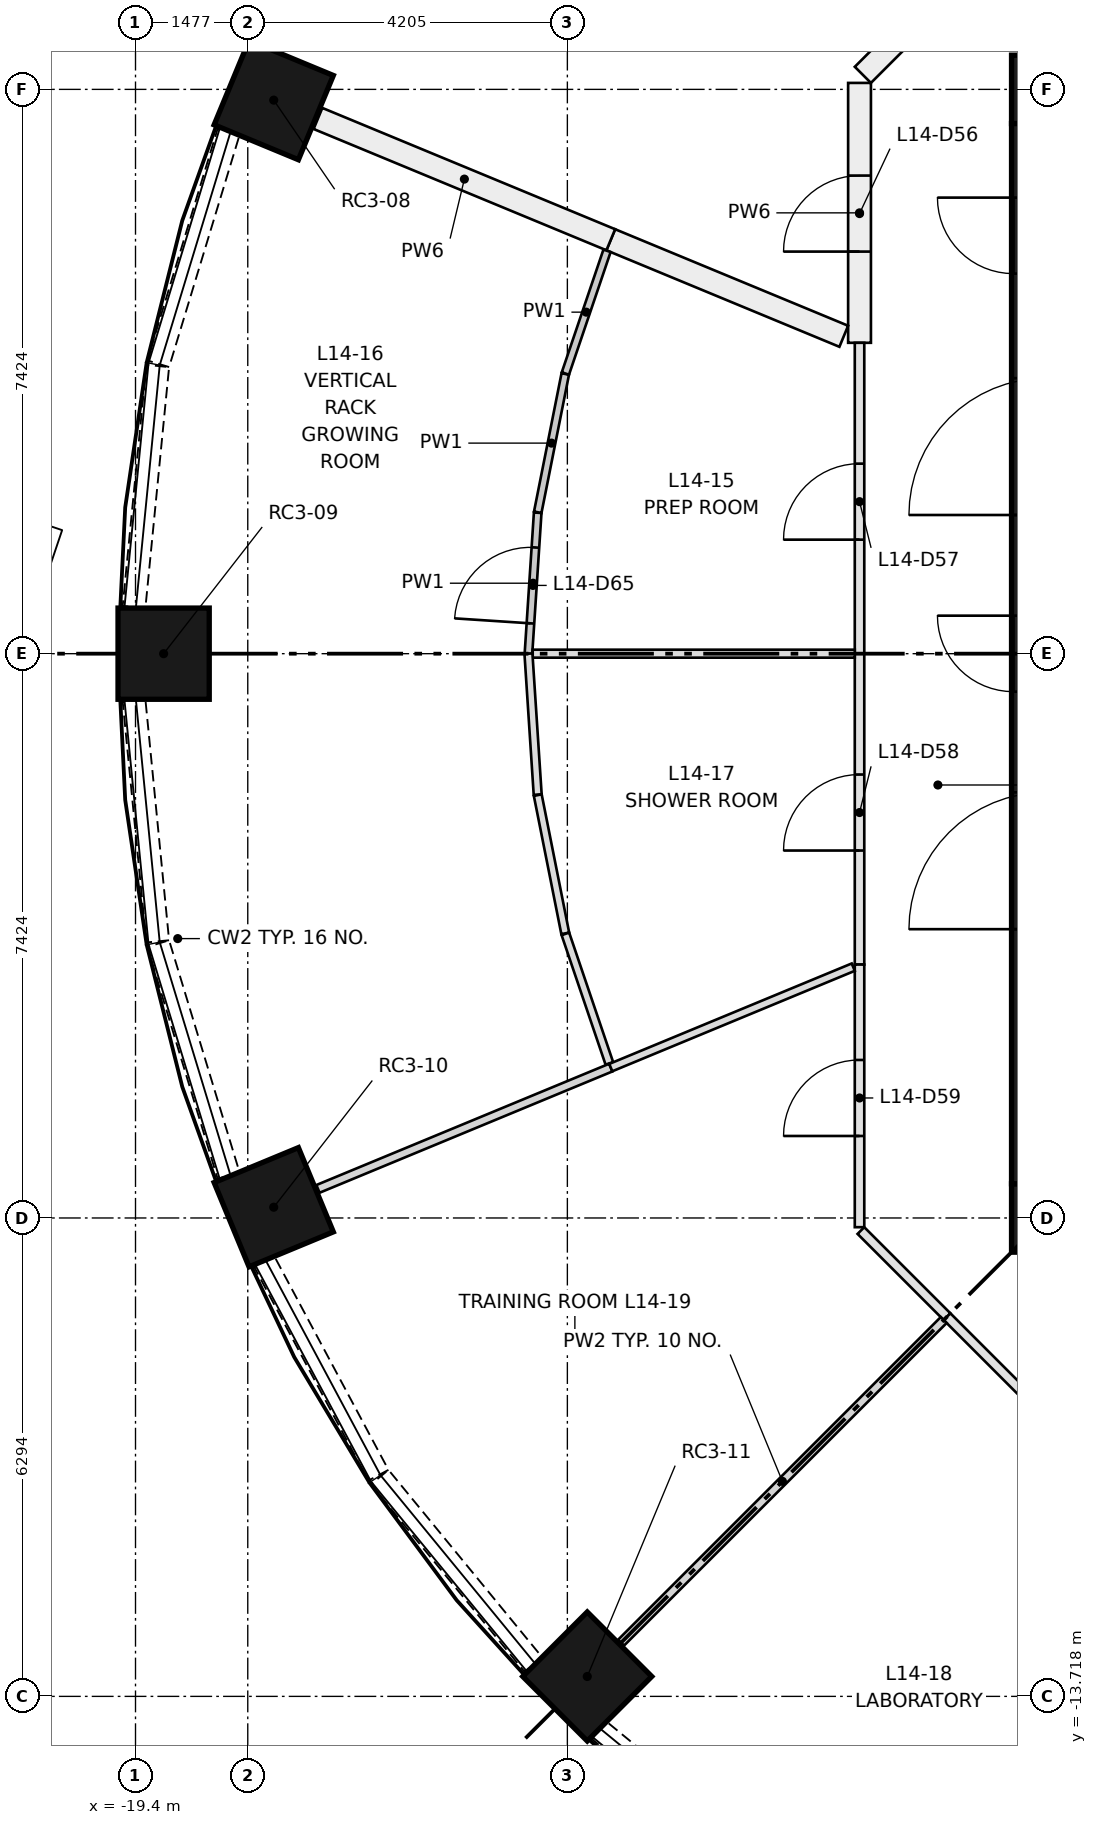
"""IFC4 building model, lengths in metres.
Left out: names, types, materials, properties, quantities, classifications, styles, units other than length and angle.
Written with IfcOpenShell. Run it as: python <this file> out.ifc"""

import sys

from ifc_helpers import new_model, si_unit, direction, frame, frame_2d, origin, origin_2d, place, context, subcontext, project, spatial, rectangle, extrude, element, fill, save


model = new_model("IFC4")
c1 = context("Model", 3, precision=1e-05, world=origin(), true_north=direction((0.0, 1.0)))
c2 = subcontext(c1, "Body", "Model", "MODEL_VIEW")
j1 = project(units=[si_unit("LENGTHUNIT", "METRE"), si_unit("PLANEANGLEUNIT", "RADIAN")], contexts=[c1])
p1 = place(None, origin())
s1 = spatial("IfcSite", under=j1, at=p1, CompositionType="ELEMENT")
p2 = place(p1, origin())
s2 = spatial("IfcBuilding", under=s1, at=p2, CompositionType="ELEMENT")
p3 = place(p2, frame((0.0, 0.0, 55.4)))
s3 = spatial("IfcBuildingStorey", under=s2, at=p3, CompositionType="ELEMENT", Elevation=55.4)
for number, where, z_axis, x_axis in (
    (1, (-17.582, 7.282, 0.0), (0.0, 0.0, 1.0), (-0.924, 0.383, 0.0)),
    (2, (-19.03, 0.0, 0.0), (0.0, 0.0, 1.0), (-1.0, 0.0, 0.0)),
    (3, (-17.582, -7.282, 0.0), (0.0, 0.0, 1.0), (-0.924, -0.383, 0.0)),
    (4, (-13.456, -13.456, 0.0), (0.0, 0.0, 1.0), (-0.707, -0.707, 0.0)),
):
    element("IfcColumn", number, at=place(p3, frame(where, z_axis=z_axis, x_axis=x_axis)), inside=s3, PredefinedType="COLUMN", context=c2, shape_type="SweptSolid", body=[
        extrude(rectangle(XDim=1.2, YDim=1.2, at=origin_2d()), origin(), (0.0, 0.0, 1.0), 3.65),
    ])
for number, where, z_axis, x_axis in (
    (5, (-7.874, -7.424, 0.0), (0.0, 0.0, 1.0), (1.0, 0.0, 0.0)),
    (6, (-7.874, 7.424, 0.0), (0.0, 0.0, 1.0), (1.0, 0.0, 0.0)),
):
    element("IfcWall", number, at=place(p3, frame(where, z_axis=z_axis, x_axis=x_axis)), inside=s3, PredefinedType="SHEAR", context=c2, shape_type="SweptSolid", body=[
        extrude(rectangle(XDim=15.748, YDim=0.9, at=frame_2d((7.874, 0.0))), origin(), (0.0, 0.0, 1.0), 3.65),
    ])
p4 = place(p3, frame((-7.424, -6.974, 0.0), z_axis=(0.0, 0.0, 1.0), x_axis=(0.0, 1.0, 0.0)))
e7 = element("IfcWall", 7, at=p4, inside=s3, PredefinedType="SHEAR", context=c2, shape_type="SweptSolid", body=[
    extrude(rectangle(XDim=13.948, YDim=0.9, at=frame_2d((6.974, 0.0))), origin(), (0.0, 0.0, 1.0), 3.65),
])
p5 = place(p4, frame((6.474, 0.0, 0.0)))
e8 = element("IfcOpeningElement", 8, at=p5, cuts=e7, PredefinedType="OPENING", context=c2, shape_type="SweptSolid", body=[
    extrude(rectangle(XDim=1.0, YDim=2.1, at=frame_2d((0.5, 1.05))), frame((0.0, 0.46, 0.0), z_axis=(0.0, -1.0, 0.0), x_axis=(1.0, 0.0, 0.0)), (0.0, 0.0, 1.0), 0.92),
])
p6 = place(p4, frame((3.35, 0.0, 0.0)))
e9 = element("IfcOpeningElement", 9, at=p6, cuts=e7, PredefinedType="OPENING", context=c2, shape_type="SweptSolid", body=[
    extrude(rectangle(XDim=1.8, YDim=2.1, at=frame_2d((0.9, 1.05))), frame((0.0, 0.46, 0.0), z_axis=(0.0, -1.0, 0.0), x_axis=(1.0, 0.0, 0.0)), (0.0, 0.0, 1.0), 0.92),
])
p7 = place(p4, frame((8.799, 0.0, 0.0)))
e10 = element("IfcOpeningElement", 10, at=p7, cuts=e7, PredefinedType="OPENING", context=c2, shape_type="SweptSolid", body=[
    extrude(rectangle(XDim=1.8, YDim=2.1, at=frame_2d((0.9, 1.05))), frame((0.0, 0.46, 0.0), z_axis=(0.0, -1.0, 0.0), x_axis=(1.0, 0.0, 0.0)), (0.0, 0.0, 1.0), 0.92),
])
p8 = place(p4, frame((11.974, 0.0, 0.0)))
e11 = element("IfcOpeningElement", 11, at=p8, cuts=e7, PredefinedType="OPENING", context=c2, shape_type="SweptSolid", body=[
    extrude(rectangle(XDim=1.0, YDim=2.1, at=frame_2d((0.5, 1.05))), frame((0.0, 0.46, 0.0), z_axis=(0.0, -1.0, 0.0), x_axis=(1.0, 0.0, 0.0)), (0.0, 0.0, 1.0), 0.92),
])
p9 = place(p3, frame((-18.175, 6.865, 0.0), z_axis=(0.0, 0.0, 1.0), x_axis=(-0.290585541792, -0.956849017819, 0.0)))
e12 = element("IfcWall", 12, at=p9, inside=s3, PredefinedType="SOLIDWALL", context=c2, shape_type="SweptSolid", body=[
    extrude(rectangle(XDim=3.188, YDim=0.3, at=frame_2d((1.594, 0.0))), origin(), (0.0, 0.0, 1.0), 0.9),
])
for number, where, z_axis, x_axis in (
    (13, (-19.107, 3.785, 0.0), (0.0, 0.0, 1.0), (-0.098, -0.995, 0.0)),
    (14, (-19.419, -0.613, 0.0), (0.0, 0.0, 1.0), (0.098, -0.995, 0.0)),
):
    element("IfcWall", number, at=place(p3, frame(where, z_axis=z_axis, x_axis=x_axis)), inside=s3, PredefinedType="SOLIDWALL", context=c2, shape_type="SweptSolid", body=[
        extrude(rectangle(XDim=3.188, YDim=0.3, at=frame_2d((1.594, 0.0))), origin(), (0.0, 0.0, 1.0), 0.9),
    ])
p10 = place(p3, frame((-19.102, -3.814, 0.0), z_axis=(0.0, 0.0, 1.0), x_axis=(0.290585541792, -0.956849017819, 0.0)))
e15 = element("IfcWall", 15, at=p10, inside=s3, PredefinedType="SOLIDWALL", context=c2, shape_type="SweptSolid", body=[
    extrude(rectangle(XDim=3.188, YDim=0.3, at=frame_2d((1.594, 0.0))), origin(), (0.0, 0.0, 1.0), 0.9),
])
p11 = place(p3, frame((-17.706, -7.998, 0.0), z_axis=(0.0, 0.0, 1.0), x_axis=(0.471260138764, -0.881994263934, 0.0)))
e16 = element("IfcWall", 16, at=p11, inside=s3, PredefinedType="SOLIDWALL", context=c2, shape_type="SweptSolid", body=[
    extrude(rectangle(XDim=3.187, YDim=0.3, at=frame_2d((1.593, 0.0))), origin(), (0.0, 0.0, 1.0), 0.9),
])
for number, where, z_axis, x_axis in (
    (17, (-16.188, -10.833, 0.0), (0.0, 0.0, 1.0), (0.634, -0.773, 0.0)),
    (18, (-13.298, -14.166, 0.0), (0.0, 0.0, 1.0), (0.773, -0.634, 0.0)),
):
    element("IfcWall", number, at=place(p3, frame(where, z_axis=z_axis, x_axis=x_axis)), inside=s3, PredefinedType="SOLIDWALL", context=c2, shape_type="SweptSolid", body=[
        extrude(rectangle(XDim=3.188, YDim=0.3, at=frame_2d((1.594, 0.0))), origin(), (0.0, 0.0, 1.0), 0.9),
    ])
p12 = place(p3, frame((-9.874, 4.09, 0.0), z_axis=(0.0, 0.0, 1.0), x_axis=(0.0, 1.0, 0.0)))
e19 = element("IfcWall", 19, at=p12, inside=s3, PredefinedType="PARTITIONING", context=c2, shape_type="SweptSolid", body=[
    extrude(rectangle(XDim=3.419, YDim=0.3, at=frame_2d((1.709, 0.0))), origin(), (0.0, 0.0, 1.0), 3.3),
])
p13 = place(p12, frame((1.2, 0.0, 0.0)))
e20 = element("IfcOpeningElement", 20, at=p13, cuts=e19, PredefinedType="OPENING", context=c2, shape_type="SweptSolid", body=[
    extrude(rectangle(XDim=1.0, YDim=2.1, at=frame_2d((0.5, 1.05))), frame((0.0, 0.16, 0.0), z_axis=(0.0, -1.0, 0.0), x_axis=(1.0, 0.0, 0.0)), (0.0, 0.0, 1.0), 0.32),
])
p14 = place(p3, frame((-9.83, 7.615, 0.0), z_axis=(0.0, 0.0, 1.0), x_axis=(0.70718471217, 0.707028841614, 0.0)))
e21 = element("IfcWall", 21, at=p14, inside=s3, PredefinedType="PARTITIONING", context=c2, shape_type="SweptSolid", body=[
    extrude(rectangle(XDim=1.566, YDim=0.3, at=frame_2d((0.783, 0.0))), origin(), (0.0, 0.0, 1.0), 3.3),
])
p15 = place(p3, frame((-9.874, 0.0, 0.0), z_axis=(0.0, 0.0, 1.0), x_axis=(0.0, 1.0, 0.0)))
e22 = element("IfcWall", 22, at=p15, inside=s3, PredefinedType="PARTITIONING", context=c2, shape_type="SweptSolid", body=[
    extrude(rectangle(XDim=4.09, YDim=0.125, at=frame_2d((2.045, 0.0))), origin(), (0.0, 0.0, 1.0), 3.3),
])
p16 = place(p15, frame((1.5, 0.0, 0.0)))
e23 = element("IfcOpeningElement", 23, at=p16, cuts=e22, PredefinedType="OPENING", context=c2, shape_type="SweptSolid", body=[
    extrude(rectangle(XDim=1.0, YDim=2.1, at=frame_2d((0.5, 1.05))), frame((0.0, 0.073, 0.0), z_axis=(0.0, -1.0, 0.0), x_axis=(1.0, 0.0, 0.0)), (0.0, 0.0, 1.0), 0.145),
])
p17 = place(p3, frame((-9.874, -4.09, 0.0), z_axis=(0.0, 0.0, 1.0), x_axis=(0.0, 1.0, 0.0)))
e24 = element("IfcWall", 24, at=p17, inside=s3, PredefinedType="PARTITIONING", context=c2, shape_type="SweptSolid", body=[
    extrude(rectangle(XDim=4.09, YDim=0.125, at=frame_2d((2.045, 0.0))), origin(), (0.0, 0.0, 1.0), 3.3),
])
p18 = place(p17, frame((1.5, 0.0, 0.0)))
e25 = element("IfcOpeningElement", 25, at=p18, cuts=e24, PredefinedType="OPENING", context=c2, shape_type="SweptSolid", body=[
    extrude(rectangle(XDim=1.0, YDim=2.1, at=frame_2d((0.5, 1.05))), frame((0.0, 0.073, 0.0), z_axis=(0.0, -1.0, 0.0), x_axis=(1.0, 0.0, 0.0)), (0.0, 0.0, 1.0), 0.145),
])
p19 = place(p3, frame((-9.874, -7.545, 0.0), z_axis=(0.0, 0.0, 1.0), x_axis=(0.0, 1.0, 0.0)))
e26 = element("IfcWall", 26, at=p19, inside=s3, PredefinedType="PARTITIONING", context=c2, shape_type="SweptSolid", body=[
    extrude(rectangle(XDim=3.455, YDim=0.125, at=frame_2d((1.728, 0.0))), origin(), (0.0, 0.0, 1.0), 3.3),
])
p20 = place(p19, frame((1.2, 0.0, 0.0)))
e27 = element("IfcOpeningElement", 27, at=p20, cuts=e26, PredefinedType="OPENING", context=c2, shape_type="SweptSolid", body=[
    extrude(rectangle(XDim=1.0, YDim=2.1, at=frame_2d((0.5, 1.05))), frame((0.0, 0.073, 0.0), z_axis=(0.0, -1.0, 0.0), x_axis=(1.0, 0.0, 0.0)), (0.0, 0.0, 1.0), 0.145),
])
for number, where, z_axis, x_axis in (
    (28, (-8.722, -8.722, 0.0), (0.0, 0.0, 1.0), (-0.707, 0.707, 0.0)),
    (29, (-7.589, -9.856, 0.0), (0.0, 0.0, 1.0), (-0.707, 0.707, 0.0)),
):
    element("IfcWall", number, at=place(p3, frame(where, z_axis=z_axis, x_axis=x_axis)), inside=s3, PredefinedType="PARTITIONING", context=c2, shape_type="SweptSolid", body=[
        extrude(rectangle(XDim=1.603, YDim=0.125, at=frame_2d((0.801, 0.0))), origin(), (0.0, 0.0, 1.0), 3.3),
    ])
p21 = place(p3, frame((-10.081, 4.176, 0.0), z_axis=(0.0, 0.0, 1.0), x_axis=(-0.923876033225, 0.382691880281, 0.0)))
e30 = element("IfcWall", 30, at=p21, inside=s3, PredefinedType="PARTITIONING", context=c2, shape_type="SweptSolid", body=[
    extrude(rectangle(XDim=3.318, YDim=0.3, at=frame_2d((1.659, 0.0))), origin(), (0.0, 0.0, 1.0), 3.3),
])
p22 = place(p3, frame((-13.147, 5.446, 0.0), z_axis=(0.0, 0.0, 1.0), x_axis=(-0.923873410436, 0.382698212028, 0.0)))
e31 = element("IfcWall", 31, at=p22, inside=s3, PredefinedType="PARTITIONING", context=c2, shape_type="SweptSolid", body=[
    extrude(rectangle(XDim=4.17, YDim=0.3, at=frame_2d((2.085, 0.0))), origin(), (0.0, 0.0, 1.0), 3.3),
])
p23 = place(p3, frame((-14.23, 0.0, 0.0), z_axis=(0.0, 0.0, 1.0), x_axis=(0.065437532333, 0.997856667745, 0.0)))
e32 = element("IfcWall", 32, at=p23, inside=s3, PredefinedType="PARTITIONING", context=c2, shape_type="SweptSolid", body=[
    extrude(rectangle(XDim=1.858, YDim=0.1, at=frame_2d((0.929, 0.0))), origin(), (0.0, 0.0, 1.0), 3.3),
])
p24 = place(p23, frame((0.4, 0.0, 0.0)))
e33 = element("IfcOpeningElement", 33, at=p24, cuts=e32, PredefinedType="OPENING", context=c2, shape_type="SweptSolid", body=[
    extrude(rectangle(XDim=1.0, YDim=2.1, at=frame_2d((0.5, 1.05))), frame((0.0, 0.06, 0.0), z_axis=(0.0, -1.0, 0.0), x_axis=(1.0, 0.0, 0.0)), (0.0, 0.0, 1.0), 0.12),
])
p25 = place(p3, frame((-14.108, 1.861, 0.0), z_axis=(0.0, 0.0, 1.0), x_axis=(0.195204777565, 0.980762506836, 0.0)))
e34 = element("IfcWall", 34, at=p25, inside=s3, PredefinedType="PARTITIONING", context=c2, shape_type="SweptSolid", body=[
    extrude(rectangle(XDim=1.855, YDim=0.1, at=frame_2d((0.927, 0.0))), origin(), (0.0, 0.0, 1.0), 3.3),
])
p26 = place(p3, frame((-13.744, 3.686, 0.0), z_axis=(0.0, 0.0, 1.0), x_axis=(0.321250473512, 0.946994262532, 0.0)))
e35 = element("IfcWall", 35, at=p26, inside=s3, PredefinedType="PARTITIONING", context=c2, shape_type="SweptSolid", body=[
    extrude(rectangle(XDim=1.705, YDim=0.1, at=frame_2d((0.852, 0.0))), origin(), (0.0, 0.0, 1.0), 3.3),
])
p27 = place(p3, frame((-9.937, 0.0, 0.0), z_axis=(0.0, 0.0, 1.0), x_axis=(-1.0, 0.0, 0.0)))
e36 = element("IfcWall", 36, at=p27, inside=s3, PredefinedType="PARTITIONING", context=c2, shape_type="SweptSolid", body=[
    extrude(rectangle(XDim=4.237, YDim=0.105, at=frame_2d((2.119, 0.0))), origin(), (0.0, 0.0, 1.0), 3.3),
])
p28 = place(p3, frame((-14.23, 0.0, 0.0), z_axis=(0.0, 0.0, 1.0), x_axis=(0.065437532333, -0.997856667745, 0.0)))
e37 = element("IfcWall", 37, at=p28, inside=s3, PredefinedType="PARTITIONING", context=c2, shape_type="SweptSolid", body=[
    extrude(rectangle(XDim=1.858, YDim=0.105, at=frame_2d((0.929, 0.0))), origin(), (0.0, 0.0, 1.0), 3.3),
])
p29 = place(p3, frame((-14.108, -1.861, 0.0), z_axis=(0.0, 0.0, 1.0), x_axis=(0.195103348377, -0.980782689209, 0.0)))
e38 = element("IfcWall", 38, at=p29, inside=s3, PredefinedType="PARTITIONING", context=c2, shape_type="SweptSolid", body=[
    extrude(rectangle(XDim=1.854, YDim=0.105, at=frame_2d((0.927, 0.0))), origin(), (0.0, 0.0, 1.0), 3.3),
])
p30 = place(p3, frame((-13.744, -3.686, 0.0), z_axis=(0.0, 0.0, 1.0), x_axis=(0.321433227273, -0.946932246998, 0.0)))
e39 = element("IfcWall", 39, at=p30, inside=s3, PredefinedType="PARTITIONING", context=c2, shape_type="SweptSolid", body=[
    extrude(rectangle(XDim=1.799, YDim=0.105, at=frame_2d((0.9, 0.0))), origin(), (0.0, 0.0, 1.0), 3.3),
])
p31 = place(p3, frame((-13.147, -5.446, 0.0), z_axis=(0.0, 0.0, 1.0), x_axis=(-0.923873410436, -0.382698212028, 0.0)))
e40 = element("IfcWall", 40, at=p31, inside=s3, PredefinedType="PARTITIONING", context=c2, shape_type="SweptSolid", body=[
    extrude(rectangle(XDim=4.17, YDim=0.11, at=frame_2d((2.085, 0.0))), origin(), (0.0, 0.0, 1.0), 3.3),
])
p32 = place(p3, frame((-9.957, -4.124, 0.0), z_axis=(0.0, 0.0, 1.0), x_axis=(-0.923867748948, -0.382711879165, 0.0)))
e41 = element("IfcWall", 41, at=p32, inside=s3, PredefinedType="PARTITIONING", context=c2, shape_type="SweptSolid", body=[
    extrude(rectangle(XDim=3.453, YDim=0.105, at=frame_2d((1.727, 0.0))), origin(), (0.0, 0.0, 1.0), 3.3),
])
p33 = place(p3, frame((-13.011, -13.011, 0.0), z_axis=(0.0, 0.0, 1.0), x_axis=(0.707106781187, 0.707106781187, 0.0)))
e42 = element("IfcWall", 42, at=p33, inside=s3, PredefinedType="PARTITIONING", context=c2, shape_type="SweptSolid", body=[
    extrude(rectangle(XDim=6.002, YDim=0.11, at=frame_2d((3.001, 0.0))), origin(), (0.0, 0.0, 1.0), 3.3),
])
p34 = place(p5, origin())
e43 = element("IfcDoor", 43, at=p34, inside=s3, OperationType="SINGLE_SWING_RIGHT", PredefinedType="DOOR", context=c2, shape_type="SweptSolid", body=[
    extrude(rectangle(XDim=1.0, YDim=2.1, at=frame_2d((0.5, 1.05))), frame((0.0, 0.45, 0.0), z_axis=(0.0, -1.0, 0.0), x_axis=(1.0, 0.0, 0.0)), (0.0, 0.0, 1.0), 0.05),
])
fill(e8, e43)
p35 = place(p8, origin())
e44 = element("IfcDoor", 44, at=p35, inside=s3, OperationType="SINGLE_SWING_RIGHT", PredefinedType="DOOR", context=c2, shape_type="SweptSolid", body=[
    extrude(rectangle(XDim=1.0, YDim=2.1, at=frame_2d((0.5, 1.05))), frame((0.0, 0.45, 0.0), z_axis=(0.0, -1.0, 0.0), x_axis=(1.0, 0.0, 0.0)), (0.0, 0.0, 1.0), 0.05),
])
fill(e11, e44)
p36 = place(p13, origin())
e45 = element("IfcDoor", 45, at=p36, inside=s3, OperationType="SINGLE_SWING_LEFT", PredefinedType="DOOR", context=c2, shape_type="SweptSolid", body=[
    extrude(rectangle(XDim=1.0, YDim=2.1, at=frame_2d((0.5, 1.05))), frame((0.0, 0.025, 0.0), z_axis=(0.0, -1.0, 0.0), x_axis=(1.0, 0.0, 0.0)), (0.0, 0.0, 1.0), 0.05),
])
fill(e20, e45)
p37 = place(p16, origin())
e46 = element("IfcDoor", 46, at=p37, inside=s3, OperationType="SINGLE_SWING_LEFT", PredefinedType="DOOR", context=c2, shape_type="SweptSolid", body=[
    extrude(rectangle(XDim=1.0, YDim=2.1, at=frame_2d((0.5, 1.05))), frame((0.0, 0.025, 0.0), z_axis=(0.0, -1.0, 0.0), x_axis=(1.0, 0.0, 0.0)), (0.0, 0.0, 1.0), 0.05),
])
fill(e23, e46)
p38 = place(p18, origin())
e47 = element("IfcDoor", 47, at=p38, inside=s3, OperationType="SINGLE_SWING_LEFT", PredefinedType="DOOR", context=c2, shape_type="SweptSolid", body=[
    extrude(rectangle(XDim=1.0, YDim=2.1, at=frame_2d((0.5, 1.05))), frame((0.0, 0.025, 0.0), z_axis=(0.0, -1.0, 0.0), x_axis=(1.0, 0.0, 0.0)), (0.0, 0.0, 1.0), 0.05),
])
fill(e25, e47)
p39 = place(p20, origin())
e48 = element("IfcDoor", 48, at=p39, inside=s3, OperationType="SINGLE_SWING_LEFT", PredefinedType="DOOR", context=c2, shape_type="SweptSolid", body=[
    extrude(rectangle(XDim=1.0, YDim=2.1, at=frame_2d((0.5, 1.05))), frame((0.0, 0.025, 0.0), z_axis=(0.0, -1.0, 0.0), x_axis=(1.0, 0.0, 0.0)), (0.0, 0.0, 1.0), 0.05),
])
fill(e27, e48)
p40 = place(p24, origin())
e49 = element("IfcDoor", 49, at=p40, inside=s3, OperationType="SINGLE_SWING_LEFT", PredefinedType="DOOR", context=c2, shape_type="SweptSolid", body=[
    extrude(rectangle(XDim=1.0, YDim=2.1, at=frame_2d((0.5, 1.05))), frame((0.0, 0.025, 0.0), z_axis=(0.0, -1.0, 0.0), x_axis=(1.0, 0.0, 0.0)), (0.0, 0.0, 1.0), 0.05),
])
fill(e33, e49)
save(model, sys.argv[1])
